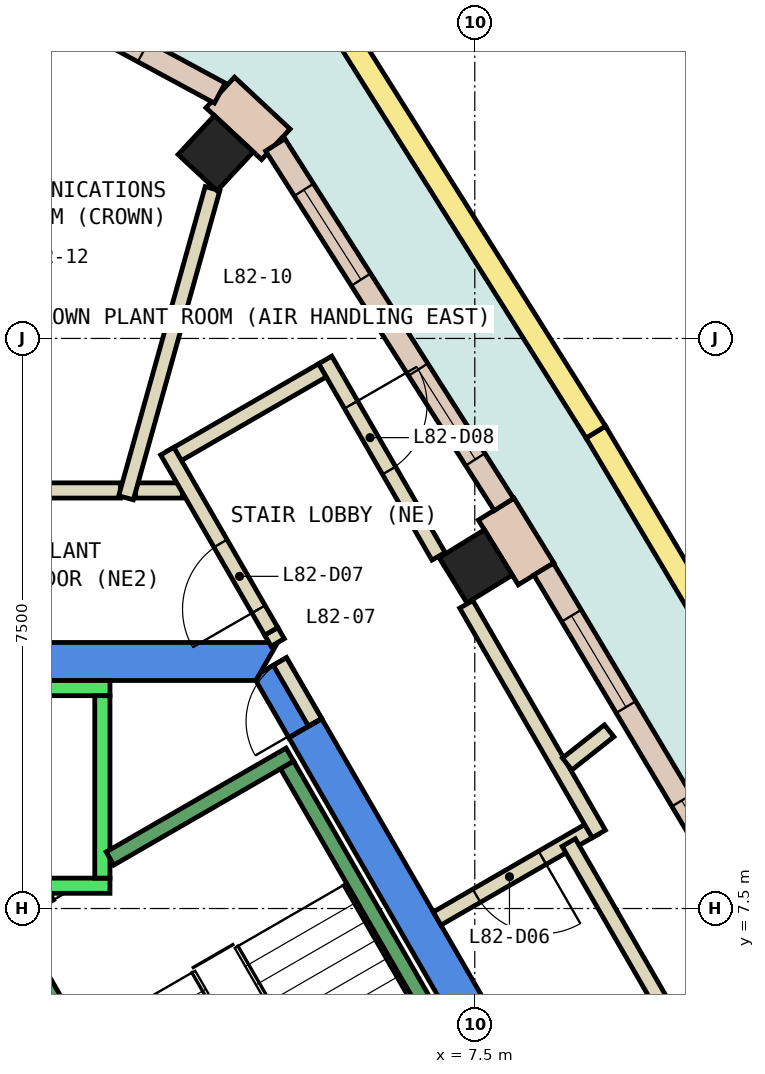
"""IFC4 building model, lengths in metres.
Left out: names, types, materials, properties, quantities, classifications, styles, units other than length and angle.
Written with IfcOpenShell. Run it as: python <this file> out.ifc"""

import sys

from ifc_helpers import new_model, si_unit, direction, frame, frame_2d, origin, origin_2d, place, context, subcontext, project, spatial, polyline, rectangle, outline, extrude, element, fill, save


model = new_model("IFC4")
c1 = context("Model", 3, precision=1e-05, world=origin(), true_north=direction((0.0, 1.0)))
c2 = subcontext(c1, "Body", "Model", "MODEL_VIEW")
j1 = project(units=[si_unit("LENGTHUNIT", "METRE"), si_unit("PLANEANGLEUNIT", "RADIAN")], contexts=[c1])
p1 = place(None, origin())
s1 = spatial("IfcSite", under=j1, at=p1, CompositionType="ELEMENT")
p2 = place(p1, origin())
s2 = spatial("IfcBuilding", under=s1, at=p2, CompositionType="ELEMENT")
p3 = place(p2, frame((0.0, 0.0, 349.4)))
s3 = spatial("IfcBuildingStorey", under=s2, at=p3, CompositionType="ELEMENT", Elevation=349.4)
for number, where, z_axis, x_axis in (
    (1, (7.512, 12.001, 0.0), (0.0, 0.0, 1.0), (-0.524, 0.851, 0.0)),
    (2, (4.091, 17.437, 0.0), (0.0, 0.0, 1.0), (-0.732, 0.682, 0.0)),
):
    element("IfcColumn", number, at=place(p3, frame(where, z_axis=z_axis, x_axis=x_axis)), inside=s3, PredefinedType="COLUMN", context=c2, shape_type="SweptSolid", body=[
        extrude(rectangle(XDim=0.7, YDim=0.7, at=origin_2d()), origin(), (0.0, 0.0, 1.0), 4.15),
    ])
p4 = place(p3, frame((0.0, 0.0, -0.45)))
e3 = element("IfcWall", 3, at=p4, inside=s3, PredefinedType="SHEAR", context=c2, shape_type="SweptSolid", body=[
    extrude(outline(polyline([(5.486, 9.998), (5.053, 9.748), (9.238, 2.5), (9.815, 2.5), (5.486, 9.998)])), origin(), (0.0, 0.0, 1.0), 4.6),
])
p5 = place(p3, frame((0.0, 0.0, 3.6)))
e4 = element("IfcWall", 4, at=p5, inside=s3, PredefinedType="SHEAR", context=c2, shape_type="SweptSolid", body=[
    extrude(outline(polyline([(5.022, 10.8), (4.677, 10.601), (4.619, 10.5), (5.053, 9.748), (5.486, 9.998), (5.022, 10.8)])), origin(), (0.0, 0.0, 1.0), 0.55),
])
p6 = place(p3, frame((0.0, 0.0, -0.45)))
e5 = element("IfcWall", 5, at=p6, inside=s3, PredefinedType="SHEAR", context=c2, shape_type="SweptSolid", body=[
    extrude(outline(polyline([(4.907, 11.0), (-4.907, 11.0), (-4.619, 10.5), (4.619, 10.5), (4.907, 11.0)])), origin(), (0.0, 0.0, 1.0), 4.6),
])
for number, where, z_axis, x_axis in (
    (6, (8.306, 11.903, 0.0), (0.0, 0.0, 1.0), (-0.524, 0.852, 0.0)),
    (7, (4.882, 17.554, 0.0), (0.0, 0.0, 1.0), (-0.731, 0.682, 0.0)),
):
    element("IfcWall", number, at=place(p3, frame(where, z_axis=z_axis, x_axis=x_axis)), inside=s3, PredefinedType="STANDARD", context=c2, shape_type="SweptSolid", body=[
        extrude(rectangle(XDim=1.0, YDim=0.55, at=frame_2d((0.5, 0.0))), origin(), (0.0, 0.0, 1.0), 4.15),
    ])
p7 = place(p3, frame((11.305, 7.104, 0.0), z_axis=(0.0, 0.0, 1.0), x_axis=(-0.512115331419, 0.858916694055, 0.0)))
e8 = element("IfcWall", 8, at=p7, inside=s3, PredefinedType="STANDARD", context=c2, shape_type="SweptSolid", body=[
    extrude(rectangle(XDim=5.661, YDim=0.3, at=frame_2d((2.83, 0.0))), origin(), (0.0, 0.0, 1.0), 4.15),
])
p8 = place(p7, frame((0.715, 0.0, 0.9)))
e9 = element("IfcOpeningElement", 9, at=p8, cuts=e8, PredefinedType="OPENING", context=c2, shape_type="SweptSolid", body=[
    extrude(rectangle(XDim=1.4, YDim=3.0, at=frame_2d((0.7, 1.5))), frame((0.0, 0.16, 0.0), z_axis=(0.0, -1.0, 0.0), x_axis=(1.0, 0.0, 0.0)), (0.0, 0.0, 1.0), 0.32),
])
p9 = place(p7, frame((3.546, 0.0, 0.9)))
e10 = element("IfcOpeningElement", 10, at=p9, cuts=e8, PredefinedType="OPENING", context=c2, shape_type="SweptSolid", body=[
    extrude(rectangle(XDim=1.4, YDim=3.0, at=frame_2d((0.7, 1.5))), frame((0.0, 0.16, 0.0), z_axis=(0.0, -1.0, 0.0), x_axis=(1.0, 0.0, 0.0)), (0.0, 0.0, 1.0), 0.32),
])
p10 = place(p3, frame((7.883, 12.816, 0.0), z_axis=(0.0, 0.0, 1.0), x_axis=(-0.536531689467, 0.84388017289, 0.0)))
e11 = element("IfcWall", 11, at=p10, inside=s3, PredefinedType="STANDARD", context=c2, shape_type="SweptSolid", body=[
    extrude(rectangle(XDim=5.606, YDim=0.3, at=frame_2d((2.803, 0.0))), origin(), (0.0, 0.0, 1.0), 4.15),
])
p11 = place(p10, frame((0.702, 0.0, 0.9)))
e12 = element("IfcOpeningElement", 12, at=p11, cuts=e11, PredefinedType="OPENING", context=c2, shape_type="SweptSolid", body=[
    extrude(rectangle(XDim=1.4, YDim=3.0, at=frame_2d((0.7, 1.5))), frame((0.0, 0.16, 0.0), z_axis=(0.0, -1.0, 0.0), x_axis=(1.0, 0.0, 0.0)), (0.0, 0.0, 1.0), 0.32),
])
p12 = place(p10, frame((3.505, 0.0, 0.9)))
e13 = element("IfcOpeningElement", 13, at=p12, cuts=e11, PredefinedType="OPENING", context=c2, shape_type="SweptSolid", body=[
    extrude(rectangle(XDim=1.4, YDim=3.0, at=frame_2d((0.7, 1.5))), frame((0.0, 0.16, 0.0), z_axis=(0.0, -1.0, 0.0), x_axis=(1.0, 0.0, 0.0)), (0.0, 0.0, 1.0), 0.32),
])
p13 = place(p3, frame((4.145, 18.228, 0.0), z_axis=(0.0, 0.0, 1.0), x_axis=(-0.879900970731, 0.475157112654, 0.0)))
e14 = element("IfcWall", 14, at=p13, inside=s3, PredefinedType="STANDARD", context=c2, shape_type="SweptSolid", body=[
    extrude(rectangle(XDim=3.689, YDim=0.3, at=frame_2d((1.845, 0.0))), origin(), (0.0, 0.0, 1.0), 4.15),
])
p14 = place(p13, frame((1.145, 0.0, 0.9)))
e15 = element("IfcOpeningElement", 15, at=p14, cuts=e14, PredefinedType="OPENING", context=c2, shape_type="SweptSolid", body=[
    extrude(rectangle(XDim=1.4, YDim=3.0, at=frame_2d((0.7, 1.5))), frame((0.0, 0.16, 0.0), z_axis=(0.0, -1.0, 0.0), x_axis=(1.0, 0.0, 0.0)), (0.0, 0.0, 1.0), 0.32),
])
p15 = place(p3, origin())
e16 = element("IfcWall", 16, at=p15, inside=s3, PredefinedType="PARAPET", context=c2, shape_type="SweptSolid", body=[
    extrude(outline(polyline([(12.99, 7.5), (9.22, 13.846), (8.964, 13.69), (12.73, 7.35), (12.99, 7.5)])), origin(), (0.0, 0.0, 1.0), 1.1),
])
p16 = place(p3, origin())
e17 = element("IfcWall", 17, at=p16, inside=s3, PredefinedType="PARAPET", context=c2, shape_type="SweptSolid", body=[
    extrude(outline(polyline([(9.22, 13.846), (5.291, 20.095), (5.079, 19.869), (8.964, 13.69), (9.22, 13.846)])), origin(), (0.0, 0.0, 1.0), 1.1),
])
p17 = place(p3, frame((9.082, 8.568, 0.0), z_axis=(0.0, 0.0, 1.0), x_axis=(-0.865955154139, -0.50012165622, 0.0)))
e18 = element("IfcWall", 18, at=p17, inside=s3, PredefinedType="PARTITIONING", context=c2, shape_type="SweptSolid", body=[
    extrude(rectangle(XDim=2.4, YDim=0.2, at=frame_2d((1.2, 0.0))), origin(), (0.0, 0.0, 1.0), 4.15),
])
p18 = place(p17, frame((0.8, 0.0, 0.0)))
e19 = element("IfcOpeningElement", 19, at=p18, cuts=e18, PredefinedType="OPENING", context=c2, shape_type="SweptSolid", body=[
    extrude(rectangle(XDim=1.0, YDim=2.1, at=frame_2d((0.5, 1.05))), frame((0.0, 0.11, 0.0), z_axis=(0.0, -1.0, 0.0), x_axis=(1.0, 0.0, 0.0)), (0.0, 0.0, 1.0), 0.22),
])
p19 = place(p3, frame((4.907, 11.0, 0.0), z_axis=(0.0, 0.0, 1.0), x_axis=(-0.5004692653, 0.865754303766, 0.0)))
e20 = element("IfcWall", 20, at=p19, inside=s3, PredefinedType="PARTITIONING", context=c2, shape_type="SweptSolid", body=[
    extrude(rectangle(XDim=0.17, YDim=0.2, at=frame_2d((0.085, 0.0))), origin(), (0.0, 0.0, 1.0), 2.4),
])
p20 = place(p3, frame((5.532, 14.717, 0.0), z_axis=(0.0, 0.0, 1.0), x_axis=(0.499916141899, -0.866073813868, 0.0)))
e21 = element("IfcWall", 21, at=p20, inside=s3, PredefinedType="PARTITIONING", context=c2, shape_type="SweptSolid", body=[
    extrude(rectangle(XDim=2.982, YDim=0.2, at=frame_2d((1.491, 0.0))), origin(), (0.0, 0.0, 1.0), 4.15),
])
p21 = place(p20, frame((0.68, 0.0, 0.0)))
e22 = element("IfcOpeningElement", 22, at=p21, cuts=e21, PredefinedType="OPENING", context=c2, shape_type="SweptSolid", body=[
    extrude(rectangle(XDim=1.0, YDim=2.1, at=frame_2d((0.5, 1.05))), frame((0.0, 0.11, 0.0), z_axis=(0.0, -1.0, 0.0), x_axis=(1.0, 0.0, 0.0)), (0.0, 0.0, 1.0), 0.22),
])
p22 = place(p3, frame((7.388, 11.502, 0.0), z_axis=(0.0, 0.0, 1.0), x_axis=(0.499993059066, -0.866029411098, 0.0)))
e23 = element("IfcWall", 23, at=p22, inside=s3, PredefinedType="PARTITIONING", context=c2, shape_type="SweptSolid", body=[
    extrude(rectangle(XDim=3.488, YDim=0.2, at=frame_2d((1.744, 0.0))), origin(), (0.0, 0.0, 1.0), 4.15),
])
p23 = place(p3, frame((3.504, 13.43, 0.0), z_axis=(0.0, 0.0, 1.0), x_axis=(0.865927408828, 0.500169693844, 0.0)))
e24 = element("IfcWall", 24, at=p23, inside=s3, PredefinedType="PARTITIONING", context=c2, shape_type="SweptSolid", body=[
    extrude(rectangle(XDim=2.3, YDim=0.2, at=frame_2d((1.15, 0.0))), origin(), (0.0, 0.0, 1.0), 4.15),
])
p24 = place(p3, frame((8.736, 8.368, 0.0), z_axis=(0.0, 0.0, 1.0), x_axis=(0.499995994493, -0.866027716353, 0.0)))
e25 = element("IfcWall", 25, at=p24, inside=s3, PredefinedType="PARTITIONING", context=c2, shape_type="SweptSolid", body=[
    extrude(rectangle(XDim=6.876, YDim=0.2, at=frame_2d((3.438, 0.0))), origin(), (0.0, 0.0, 1.0), 4.15),
])
p25 = place(p24, frame((5.576, 0.0, 0.0)))
e26 = element("IfcOpeningElement", 26, at=p25, cuts=e25, PredefinedType="OPENING", context=c2, shape_type="SweptSolid", body=[
    extrude(rectangle(XDim=1.0, YDim=2.1, at=frame_2d((0.5, 1.05))), frame((0.0, 0.11, 0.0), z_axis=(0.0, -1.0, 0.0), x_axis=(1.0, 0.0, 0.0)), (0.0, 0.0, 1.0), 0.22),
])
p26 = place(p3, frame((3.038, 13.0, 0.0), z_axis=(0.0, 0.0, 1.0), x_axis=(1.0, 0.0, 0.0)))
e27 = element("IfcWall", 27, at=p26, inside=s3, PredefinedType="PARTITIONING", context=c2, shape_type="SweptSolid", body=[
    extrude(rectangle(XDim=0.614, YDim=0.2, at=frame_2d((0.307, 0.0))), origin(), (0.0, 0.0, 1.0), 4.15),
])
p27 = place(p3, frame((0.0, 13.0, 0.0), z_axis=(0.0, 0.0, 1.0), x_axis=(1.0, 0.0, 0.0)))
e28 = element("IfcWall", 28, at=p27, inside=s3, PredefinedType="PARTITIONING", context=c2, shape_type="SweptSolid", body=[
    extrude(rectangle(XDim=2.838, YDim=0.2, at=frame_2d((1.419, 0.0))), origin(), (0.0, 0.0, 1.0), 4.15),
])
p28 = place(p27, frame((0.909, 0.0, 0.0)))
e29 = element("IfcOpeningElement", 29, at=p28, cuts=e28, PredefinedType="OPENING", context=c2, shape_type="SweptSolid", body=[
    extrude(rectangle(XDim=1.0, YDim=2.1, at=frame_2d((0.5, 1.05))), frame((0.0, 0.11, 0.0), z_axis=(0.0, -1.0, 0.0), x_axis=(1.0, 0.0, 0.0)), (0.0, 0.0, 1.0), 0.22),
])
p29 = place(p3, frame((9.268, 9.838, 0.0), z_axis=(0.0, 0.0, 1.0), x_axis=(-0.784572335163, -0.620037297988, 0.0)))
e30 = element("IfcWall", 30, at=p29, inside=s3, PredefinedType="PARTITIONING", context=c2, shape_type="SweptSolid", body=[
    extrude(rectangle(XDim=0.705, YDim=0.2, at=frame_2d((0.353, 0.0))), origin(), (0.0, 0.0, 1.0), 4.15),
])
p30 = place(p3, frame((2.911, 12.904, 0.0), z_axis=(0.0, 0.0, 1.0), x_axis=(0.269509843473, 0.962997634614, 0.0)))
e31 = element("IfcWall", 31, at=p30, inside=s3, PredefinedType="PARTITIONING", context=c2, shape_type="SweptSolid", body=[
    extrude(rectangle(XDim=4.223, YDim=0.2, at=frame_2d((2.112, 0.0))), origin(), (0.0, 0.0, 1.0), 4.15),
])
p31 = place(p3, frame((5.399, 9.948, 0.0), z_axis=(0.0, 0.0, 1.0), x_axis=(-0.499882215713, 0.866093395895, 0.0)))
e32 = element("IfcWall", 32, at=p31, inside=s3, PredefinedType="PARTITIONING", context=c2, shape_type="SweptSolid", body=[
    extrude(rectangle(XDim=0.926, YDim=0.2, at=frame_2d((0.463, 0.0))), origin(), (0.0, 0.0, 1.0), 2.4),
])
p32 = place(p31, frame((0.017, 0.0, 0.0)))
e33 = element("IfcOpeningElement", 33, at=p32, cuts=e32, PredefinedType="OPENING", context=c2, shape_type="SweptSolid", body=[
    extrude(rectangle(XDim=0.9, YDim=2.1, at=frame_2d((0.45, 1.05))), frame((0.0, 0.11, 0.0), z_axis=(0.0, -1.0, 0.0), x_axis=(1.0, 0.0, 0.0)), (0.0, 0.0, 1.0), 0.22),
])
p33 = place(p3, frame((4.822, 11.147, 0.0), z_axis=(0.0, 0.0, 1.0), x_axis=(-0.499871764879, 0.866099427708, 0.0)))
e34 = element("IfcWall", 34, at=p33, inside=s3, PredefinedType="PARTITIONING", context=c2, shape_type="SweptSolid", body=[
    extrude(rectangle(XDim=2.737, YDim=0.2, at=frame_2d((1.368, 0.0))), origin(), (0.0, 0.0, 1.0), 4.15),
])
p34 = place(p33, frame((0.335, 0.0, 0.0)))
e35 = element("IfcOpeningElement", 35, at=p34, cuts=e34, PredefinedType="OPENING", context=c2, shape_type="SweptSolid", body=[
    extrude(rectangle(XDim=1.0, YDim=2.1, at=frame_2d((0.5, 1.05))), frame((0.0, 0.11, 0.0), z_axis=(0.0, -1.0, 0.0), x_axis=(1.0, 0.0, 0.0)), (0.0, 0.0, 1.0), 0.22),
])
for number, where, z_axis, x_axis in (
    (36, (2.7, 7.8, 0.0), (0.0, 0.0, 1.0), (-1.0, 0.0, 0.0)),
    (37, (2.7, 10.4, 0.0), (0.0, 0.0, 1.0), (-1.0, 0.0, 0.0)),
):
    element("IfcWall", number, at=place(p3, frame(where, z_axis=z_axis, x_axis=x_axis)), inside=s3, PredefinedType="STANDARD", context=c2, shape_type="SweptSolid", body=[
        extrude(rectangle(XDim=5.4, YDim=0.2, at=frame_2d((2.7, 0.0))), origin(), (0.0, 0.0, 1.0), 4.15),
    ])
p35 = place(p3, frame((2.6, 7.9, 0.0), z_axis=(0.0, 0.0, 1.0), x_axis=(0.0, 1.0, 0.0)))
e38 = element("IfcWall", 38, at=p35, inside=s3, PredefinedType="STANDARD", context=c2, shape_type="SweptSolid", body=[
    extrude(rectangle(XDim=2.4, YDim=0.2, at=frame_2d((1.2, 0.0))), origin(), (0.0, 0.0, 1.0), 4.15),
])
p36 = place(p3, frame((2.7, 8.158, 0.0), z_axis=(0.0, 0.0, 1.0), x_axis=(0.86611865017, 0.499838457731, 0.0)))
e39 = element("IfcWall", 39, at=p36, inside=s3, PredefinedType="STANDARD", context=c2, shape_type="SweptSolid", body=[
    extrude(rectangle(XDim=2.733, YDim=0.2, at=frame_2d((1.366, 0.0))), origin(), (0.0, 0.0, 1.0), 4.15),
])
p37 = place(p3, frame((1.256, 7.324, 0.0), z_axis=(0.0, 0.0, 1.0), x_axis=(0.865915093549, 0.500191014278, 0.0)))
e40 = element("IfcWall", 40, at=p37, inside=s3, PredefinedType="STANDARD", context=c2, shape_type="SweptSolid", body=[
    extrude(rectangle(XDim=0.752, YDim=0.2, at=frame_2d((0.376, 0.0))), origin(), (0.0, 0.0, 1.0), 4.15),
])
p38 = place(p3, frame((4.843, 1.312, 0.0), z_axis=(0.0, 0.0, 1.0), x_axis=(-0.499963383562, 0.866046543262, 0.0)))
e41 = element("IfcWall", 41, at=p38, inside=s3, PredefinedType="STANDARD", context=c2, shape_type="SweptSolid", body=[
    extrude(rectangle(XDim=6.9, YDim=0.2, at=frame_2d((3.45, 0.0))), origin(), (0.0, 0.0, 1.0), 4.15),
])
p39 = place(p38, frame((0.45, 0.0, 0.0)))
e42 = element("IfcOpeningElement", 42, at=p39, cuts=e41, PredefinedType="OPENING", context=c2, shape_type="SweptSolid", body=[
    extrude(rectangle(XDim=1.1, YDim=2.2, at=frame_2d((0.55, 1.1))), frame((0.0, 0.11, 0.0), z_axis=(0.0, -1.0, 0.0), x_axis=(1.0, 0.0, 0.0)), (0.0, 0.0, 1.0), 0.22),
])
p40 = place(p3, frame((8.48, 3.412, 0.0), z_axis=(0.0, 0.0, 1.0), x_axis=(-0.499978703459, 0.866037698999, 0.0)))
e43 = element("IfcWall", 43, at=p40, inside=s3, PredefinedType="STANDARD", context=c2, shape_type="SweptSolid", body=[
    extrude(rectangle(XDim=6.9, YDim=0.2, at=frame_2d((3.45, 0.0))), origin(), (0.0, 0.0, 1.0), 4.15),
])
p41 = place(p8, origin())
e44 = element("IfcWindow", 44, at=p41, inside=s3, PartitioningType="SINGLE_PANEL", PredefinedType="WINDOW", context=c2, shape_type="SweptSolid", body=[
    extrude(rectangle(XDim=1.4, YDim=3.0, at=frame_2d((0.7, 1.5))), frame((0.0, 0.03, 0.0), z_axis=(0.0, -1.0, 0.0), x_axis=(1.0, 0.0, 0.0)), (0.0, 0.0, 1.0), 0.06),
])
fill(e9, e44)
p42 = place(p9, origin())
e45 = element("IfcWindow", 45, at=p42, inside=s3, PartitioningType="SINGLE_PANEL", PredefinedType="WINDOW", context=c2, shape_type="SweptSolid", body=[
    extrude(rectangle(XDim=1.4, YDim=3.0, at=frame_2d((0.7, 1.5))), frame((0.0, 0.03, 0.0), z_axis=(0.0, -1.0, 0.0), x_axis=(1.0, 0.0, 0.0)), (0.0, 0.0, 1.0), 0.06),
])
fill(e10, e45)
p43 = place(p11, origin())
e46 = element("IfcWindow", 46, at=p43, inside=s3, PartitioningType="SINGLE_PANEL", PredefinedType="WINDOW", context=c2, shape_type="SweptSolid", body=[
    extrude(rectangle(XDim=1.4, YDim=3.0, at=frame_2d((0.7, 1.5))), frame((0.0, 0.03, 0.0), z_axis=(0.0, -1.0, 0.0), x_axis=(1.0, 0.0, 0.0)), (0.0, 0.0, 1.0), 0.06),
])
fill(e12, e46)
p44 = place(p12, origin())
e47 = element("IfcWindow", 47, at=p44, inside=s3, PartitioningType="SINGLE_PANEL", PredefinedType="WINDOW", context=c2, shape_type="SweptSolid", body=[
    extrude(rectangle(XDim=1.4, YDim=3.0, at=frame_2d((0.7, 1.5))), frame((0.0, 0.03, 0.0), z_axis=(0.0, -1.0, 0.0), x_axis=(1.0, 0.0, 0.0)), (0.0, 0.0, 1.0), 0.06),
])
fill(e13, e47)
p45 = place(p14, origin())
e48 = element("IfcWindow", 48, at=p45, inside=s3, PartitioningType="SINGLE_PANEL", PredefinedType="WINDOW", context=c2, shape_type="SweptSolid", body=[
    extrude(rectangle(XDim=1.4, YDim=3.0, at=frame_2d((0.7, 1.5))), frame((0.0, 0.03, 0.0), z_axis=(0.0, -1.0, 0.0), x_axis=(1.0, 0.0, 0.0)), (0.0, 0.0, 1.0), 0.06),
])
fill(e15, e48)
p46 = place(p18, origin())
e49 = element("IfcDoor", 49, at=p46, inside=s3, OperationType="SINGLE_SWING_LEFT", PredefinedType="DOOR", context=c2, shape_type="SweptSolid", body=[
    extrude(rectangle(XDim=1.0, YDim=2.1, at=frame_2d((0.5, 1.05))), frame((0.0, 0.025, 0.0), z_axis=(0.0, -1.0, 0.0), x_axis=(1.0, 0.0, 0.0)), (0.0, 0.0, 1.0), 0.05),
])
fill(e19, e49)
p47 = place(p34, origin())
e50 = element("IfcDoor", 50, at=p47, inside=s3, OperationType="SINGLE_SWING_RIGHT", PredefinedType="DOOR", context=c2, shape_type="SweptSolid", body=[
    extrude(rectangle(XDim=1.0, YDim=2.1, at=frame_2d((0.5, 1.05))), frame((0.0, 0.025, 0.0), z_axis=(0.0, -1.0, 0.0), x_axis=(1.0, 0.0, 0.0)), (0.0, 0.0, 1.0), 0.05),
])
fill(e35, e50)
p48 = place(p21, origin())
e51 = element("IfcDoor", 51, at=p48, inside=s3, OperationType="SINGLE_SWING_LEFT", PredefinedType="DOOR", context=c2, shape_type="SweptSolid", body=[
    extrude(rectangle(XDim=1.0, YDim=2.1, at=frame_2d((0.5, 1.05))), frame((0.0, 0.025, 0.0), z_axis=(0.0, -1.0, 0.0), x_axis=(1.0, 0.0, 0.0)), (0.0, 0.0, 1.0), 0.05),
])
fill(e22, e51)
p49 = place(p32, origin())
e52 = element("IfcDoor", 52, at=p49, inside=s3, OperationType="SINGLE_SWING_LEFT", PredefinedType="DOOR", context=c2, shape_type="SweptSolid", body=[
    extrude(rectangle(XDim=0.9, YDim=2.1, at=frame_2d((0.45, 1.05))), frame((0.0, 0.025, 0.0), z_axis=(0.0, -1.0, 0.0), x_axis=(1.0, 0.0, 0.0)), (0.0, 0.0, 1.0), 0.05),
])
fill(e33, e52)
save(model, sys.argv[1])
